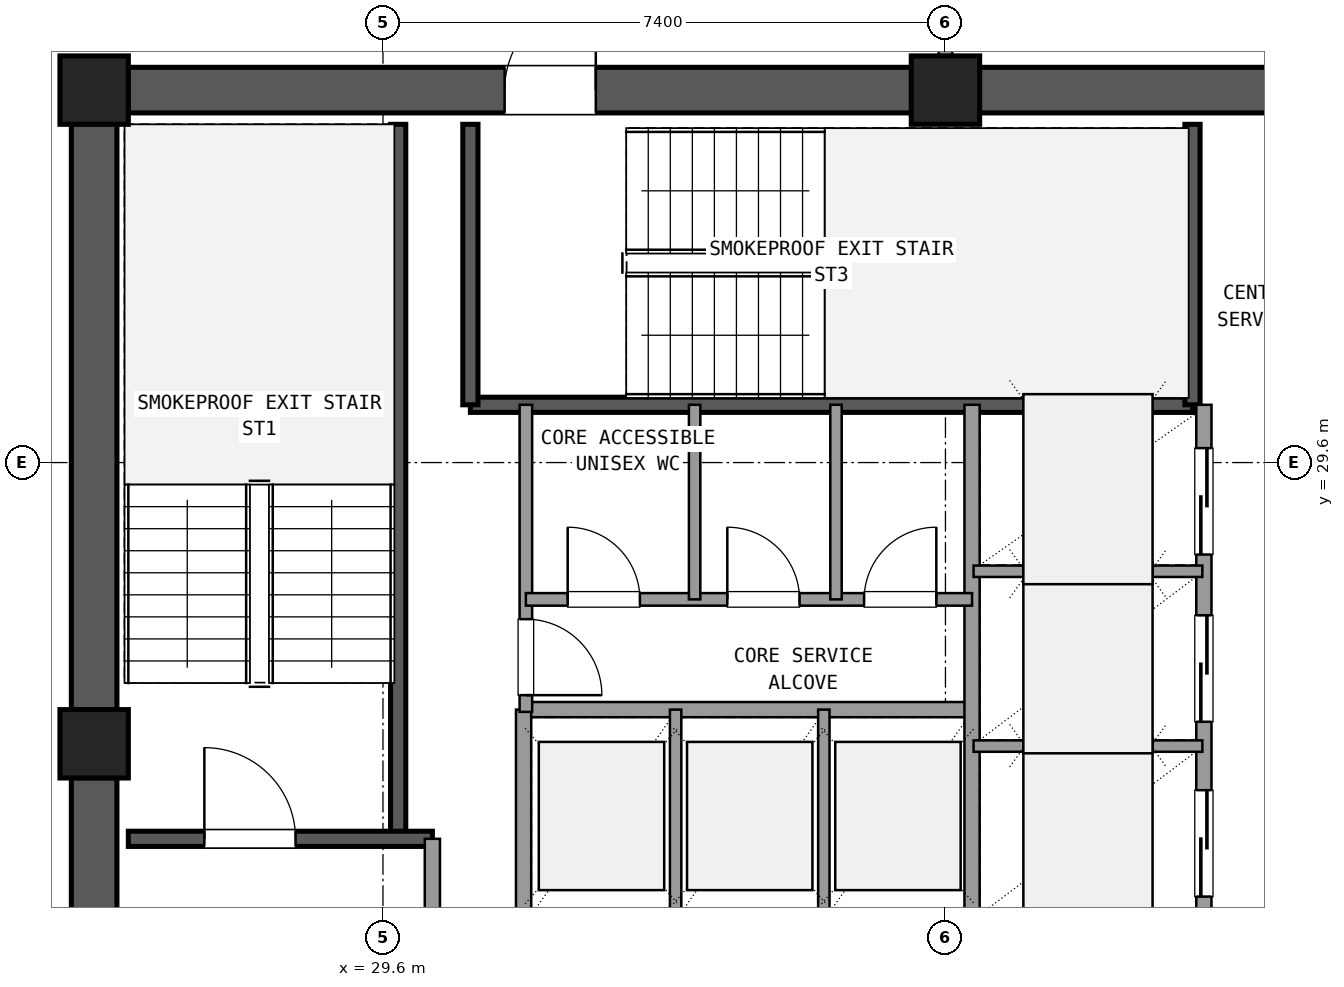
"""IFC4 building model, lengths in metres.
Left out: names, types, materials, properties, quantities, classifications, styles, units other than length and angle.
Written with IfcOpenShell. Run it as: python <this file> out.ifc"""

import sys

from ifc_helpers import new_model, si_unit, direction, frame, frame_2d, origin, origin_2d, place, context, subcontext, project, spatial, rectangle, extrude, element, fill, save


model = new_model("IFC4")
c1 = context("Model", 3, precision=1e-05, world=origin(), true_north=direction((0.0, 1.0)))
c2 = subcontext(c1, "Body", "Model", "MODEL_VIEW")
j1 = project(units=[si_unit("LENGTHUNIT", "METRE"), si_unit("PLANEANGLEUNIT", "RADIAN")], contexts=[c1])
p1 = place(None, origin())
s1 = spatial("IfcSite", under=j1, at=p1, CompositionType="ELEMENT")
p2 = place(p1, origin())
s2 = spatial("IfcBuilding", under=s1, at=p2, CompositionType="ELEMENT")
p3 = place(p2, frame((0.0, 0.0, 253.62)))
s3 = spatial("IfcBuildingStorey", under=s2, at=p3, CompositionType="ELEMENT", Elevation=253.62)
for number, where, z_axis, x_axis in (
    (1, (37.0, 34.5, 0.0), (0.0, 0.0, 1.0), (1.0, 0.0, 0.0)),
    (2, (25.8, 34.5, 0.0), (0.0, 0.0, 1.0), (1.0, 0.0, 0.0)),
    (3, (25.8, 25.9, 0.0), (0.0, 0.0, 1.0), (1.0, 0.0, 0.0)),
):
    element("IfcColumn", number, at=place(p3, frame(where, z_axis=z_axis, x_axis=x_axis)), inside=s3, PredefinedType="COLUMN", context=c2, shape_type="SweptSolid", body=[
        extrude(rectangle(XDim=0.9, YDim=0.9, at=origin_2d()), origin(), (0.0, 0.0, 1.0), 3.6),
    ])
p4 = place(p3, frame((47.755, 34.5, 0.0), z_axis=(0.0, 0.0, 1.0), x_axis=(-1.0, 0.0, 0.0)))
e4 = element("IfcWall", 4, at=p4, inside=s3, PredefinedType="SHEAR", context=c2, shape_type="SweptSolid", body=[
    extrude(rectangle(XDim=10.31, YDim=0.6, at=frame_2d((5.155, 0.0))), origin(), (0.0, 0.0, 1.0), 3.32),
])
p5 = place(p4, frame((4.655, 0.0, 0.0)))
e5 = element("IfcOpeningElement", 5, at=p5, cuts=e4, PredefinedType="OPENING", context=c2, shape_type="SweptSolid", body=[
    extrude(rectangle(XDim=1.6, YDim=2.2, at=frame_2d((0.8, 1.1))), frame((0.0, 0.31, 0.0), z_axis=(0.0, -1.0, 0.0), x_axis=(1.0, 0.0, 0.0)), (0.0, 0.0, 1.0), 0.62),
])
p6 = place(p3, frame((36.555, 34.5, 0.0), z_axis=(0.0, 0.0, 1.0), x_axis=(-1.0, 0.0, 0.0)))
e6 = element("IfcWall", 6, at=p6, inside=s3, PredefinedType="SHEAR", context=c2, shape_type="SweptSolid", body=[
    extrude(rectangle(XDim=10.31, YDim=0.6, at=frame_2d((5.155, 0.0))), origin(), (0.0, 0.0, 1.0), 3.32),
])
p7 = place(p6, frame((4.155, 0.0, 0.0)))
e7 = element("IfcOpeningElement", 7, at=p7, cuts=e6, PredefinedType="OPENING", context=c2, shape_type="SweptSolid", body=[
    extrude(rectangle(XDim=1.2, YDim=2.15, at=frame_2d((0.6, 1.075))), frame((0.0, 0.31, 0.0), z_axis=(0.0, -1.0, 0.0), x_axis=(1.0, 0.0, 0.0)), (0.0, 0.0, 1.0), 0.62),
])
p8 = place(p3, frame((25.8, 34.055, 0.0), z_axis=(0.0, 0.0, 1.0), x_axis=(0.0, -1.0, 0.0)))
e8 = element("IfcWall", 8, at=p8, inside=s3, PredefinedType="SHEAR", context=c2, shape_type="SweptSolid", body=[
    extrude(rectangle(XDim=7.71, YDim=0.6, at=frame_2d((3.855, 0.0))), origin(), (0.0, 0.0, 1.0), 3.32),
])
p9 = place(p3, frame((25.8, 25.455, 0.0), z_axis=(0.0, 0.0, 1.0), x_axis=(0.0, -1.0, 0.0)))
e9 = element("IfcWall", 9, at=p9, inside=s3, PredefinedType="SHEAR", context=c2, shape_type="SweptSolid", body=[
    extrude(rectangle(XDim=7.71, YDim=0.6, at=frame_2d((3.855, 0.0))), origin(), (0.0, 0.0, 1.0), 3.32),
])
p10 = place(p9, frame((2.205, 0.0, 0.0)))
e10 = element("IfcOpeningElement", 10, at=p10, cuts=e9, PredefinedType="OPENING", context=c2, shape_type="SweptSolid", body=[
    extrude(rectangle(XDim=1.2, YDim=2.15, at=frame_2d((0.6, 1.075))), frame((0.0, 0.31, 0.0), z_axis=(0.0, -1.0, 0.0), x_axis=(1.0, 0.0, 0.0)), (0.0, 0.0, 1.0), 0.62),
])
p11 = place(p3, frame((29.8, 24.65, 0.0), z_axis=(0.0, 0.0, 1.0), x_axis=(0.0, 1.0, 0.0)))
e11 = element("IfcWall", 11, at=p11, inside=s3, PredefinedType="SHEAR", context=c2, shape_type="SweptSolid", body=[
    extrude(rectangle(XDim=9.4, YDim=0.2, at=frame_2d((4.7, 0.0))), origin(), (0.0, 0.0, 1.0), 3.32),
])
p12 = place(p3, frame((26.25, 24.65, 0.0), z_axis=(0.0, 0.0, 1.0), x_axis=(1.0, 0.0, 0.0)))
e12 = element("IfcWall", 12, at=p12, inside=s3, PredefinedType="SHEAR", context=c2, shape_type="SweptSolid", body=[
    extrude(rectangle(XDim=4.0, YDim=0.2, at=frame_2d((2.0, 0.0))), origin(), (0.0, 0.0, 1.0), 3.32),
])
p13 = place(p12, frame((1.0, 0.0, 0.0)))
e13 = element("IfcOpeningElement", 13, at=p13, cuts=e12, PredefinedType="OPENING", context=c2, shape_type="SweptSolid", body=[
    extrude(rectangle(XDim=1.2, YDim=2.15, at=frame_2d((0.6, 1.075))), frame((0.0, 0.11, 0.0), z_axis=(0.0, -1.0, 0.0), x_axis=(1.0, 0.0, 0.0)), (0.0, 0.0, 1.0), 0.22),
])
p14 = place(p3, frame((30.75, 30.36, 0.0), z_axis=(0.0, 0.0, 1.0), x_axis=(1.0, 0.0, 0.0)))
e14 = element("IfcWall", 14, at=p14, inside=s3, PredefinedType="SHEAR", context=c2, shape_type="SweptSolid", body=[
    extrude(rectangle(XDim=9.5, YDim=0.2, at=frame_2d((4.75, 0.0))), origin(), (0.0, 0.0, 1.0), 3.32),
])
for number, where, z_axis, x_axis in (
    (15, (30.75, 30.36, 0.0), (0.0, 0.0, 1.0), (0.0, 1.0, 0.0)),
    (16, (40.25, 30.36, 0.0), (0.0, 0.0, 1.0), (0.0, 1.0, 0.0)),
):
    element("IfcWall", number, at=place(p3, frame(where, z_axis=z_axis, x_axis=x_axis)), inside=s3, PredefinedType="SHEAR", context=c2, shape_type="SweptSolid", body=[
        extrude(rectangle(XDim=3.69, YDim=0.2, at=frame_2d((1.845, 0.0))), origin(), (0.0, 0.0, 1.0), 3.32),
    ])
p15 = place(p3, frame((30.25, 17.75, 0.0), z_axis=(0.0, 0.0, 1.0), x_axis=(0.0, 1.0, 0.0)))
e17 = element("IfcWall", 17, at=p15, inside=s3, PredefinedType="SOLIDWALL", context=c2, shape_type="SweptSolid", body=[
    extrude(rectangle(XDim=6.9, YDim=0.2, at=frame_2d((3.45, 0.0))), origin(), (0.0, 0.0, 1.0), 2.61),
])
p16 = place(p15, frame((4.15, 0.0, 0.0)))
e18 = element("IfcOpeningElement", 18, at=p16, cuts=e17, PredefinedType="OPENING", context=c2, shape_type="SweptSolid", body=[
    extrude(rectangle(XDim=1.2, YDim=2.15, at=frame_2d((0.6, 1.075))), frame((0.0, 0.11, 0.0), z_axis=(0.0, -1.0, 0.0), x_axis=(1.0, 0.0, 0.0)), (0.0, 0.0, 1.0), 0.22),
])
p17 = place(p3, frame((31.45, 26.35, 0.0), z_axis=(0.0, 0.0, 1.0), x_axis=(1.0, 0.0, 0.0)))
e19 = element("IfcWall", 19, at=p17, inside=s3, PredefinedType="SOLIDWALL", context=c2, shape_type="SweptSolid", body=[
    extrude(rectangle(XDim=5.9, YDim=0.2, at=frame_2d((2.95, 0.0))), origin(), (0.0, 0.0, 1.0), 2.61),
])
p18 = place(p3, frame((31.45, 23.54, 0.0), z_axis=(0.0, 0.0, 1.0), x_axis=(0.0, 1.0, 0.0)))
e20 = element("IfcWall", 20, at=p18, inside=s3, PredefinedType="SOLIDWALL", context=c2, shape_type="SweptSolid", body=[
    extrude(rectangle(XDim=2.81, YDim=0.2, at=frame_2d((1.405, 0.0))), origin(), (0.0, 0.0, 1.0), 2.61),
])
for number, where, z_axis, x_axis in (
    (21, (33.45, 23.54, 0.0), (0.0, 0.0, 1.0), (0.0, 1.0, 0.0)),
    (22, (35.4, 23.54, 0.0), (0.0, 0.0, 1.0), (0.0, 1.0, 0.0)),
):
    element("IfcWall", number, at=place(p3, frame(where, z_axis=z_axis, x_axis=x_axis)), inside=s3, PredefinedType="PARTITIONING", context=c2, shape_type="SweptSolid", body=[
        extrude(rectangle(XDim=2.81, YDim=0.15, at=frame_2d((1.405, 0.0))), origin(), (0.0, 0.0, 1.0), 2.61),
    ])
p19 = place(p3, frame((37.35, 23.54, 0.0), z_axis=(0.0, 0.0, 1.0), x_axis=(0.0, 1.0, 0.0)))
e23 = element("IfcWall", 23, at=p19, inside=s3, PredefinedType="SOLIDWALL", context=c2, shape_type="SweptSolid", body=[
    extrude(rectangle(XDim=6.82, YDim=0.2, at=frame_2d((3.41, 0.0))), origin(), (0.0, 0.0, 1.0), 2.61),
])
p20 = place(p3, frame((40.4, 23.54, 0.0), z_axis=(0.0, 0.0, 1.0), x_axis=(0.0, 1.0, 0.0)))
e24 = element("IfcWall", 24, at=p20, inside=s3, PredefinedType="SOLIDWALL", context=c2, shape_type="SweptSolid", body=[
    extrude(rectangle(XDim=6.82, YDim=0.2, at=frame_2d((3.41, 0.0))), origin(), (0.0, 0.0, 1.0), 2.61),
])
p21 = place(p20, frame((0.35, 0.0, 0.0)))
e25 = element("IfcOpeningElement", 25, at=p21, cuts=e24, PredefinedType="OPENING", context=c2, shape_type="SweptSolid", body=[
    extrude(rectangle(XDim=1.4, YDim=2.2, at=frame_2d((0.7, 1.1))), frame((0.0, 0.11, 0.0), z_axis=(0.0, -1.0, 0.0), x_axis=(1.0, 0.0, 0.0)), (0.0, 0.0, 1.0), 0.22),
])
p22 = place(p20, frame((2.65, 0.0, 0.0)))
e26 = element("IfcOpeningElement", 26, at=p22, cuts=e24, PredefinedType="OPENING", context=c2, shape_type="SweptSolid", body=[
    extrude(rectangle(XDim=1.4, YDim=2.2, at=frame_2d((0.7, 1.1))), frame((0.0, 0.11, 0.0), z_axis=(0.0, -1.0, 0.0), x_axis=(1.0, 0.0, 0.0)), (0.0, 0.0, 1.0), 0.22),
])
p23 = place(p20, frame((4.85, 0.0, 0.0)))
e27 = element("IfcOpeningElement", 27, at=p23, cuts=e24, PredefinedType="OPENING", context=c2, shape_type="SweptSolid", body=[
    extrude(rectangle(XDim=1.4, YDim=2.2, at=frame_2d((0.7, 1.1))), frame((0.0, 0.11, 0.0), z_axis=(0.0, -1.0, 0.0), x_axis=(1.0, 0.0, 0.0)), (0.0, 0.0, 1.0), 0.22),
])
for number, where, z_axis, x_axis in (
    (28, (37.37, 25.87, 0.0), (0.0, 0.0, 1.0), (1.0, 0.0, 0.0)),
    (29, (37.37, 28.17, 0.0), (0.0, 0.0, 1.0), (1.0, 0.0, 0.0)),
):
    element("IfcWall", number, at=place(p3, frame(where, z_axis=z_axis, x_axis=x_axis)), inside=s3, PredefinedType="PARTITIONING", context=c2, shape_type="SweptSolid", body=[
        extrude(rectangle(XDim=3.01, YDim=0.15, at=frame_2d((1.505, 0.0))), origin(), (0.0, 0.0, 1.0), 2.61),
    ])
p24 = place(p3, frame((31.48, 26.32, 0.0), z_axis=(0.0, 0.0, 1.0), x_axis=(0.0, 1.0, 0.0)))
e30 = element("IfcWall", 30, at=p24, inside=s3, PredefinedType="PLUMBINGWALL", context=c2, shape_type="SweptSolid", body=[
    extrude(rectangle(XDim=4.04, YDim=0.165, at=frame_2d((2.02, 0.0))), origin(), (0.0, 0.0, 1.0), 2.61),
])
p25 = place(p24, frame((0.22, 0.0, 0.0)))
e31 = element("IfcOpeningElement", 31, at=p25, cuts=e30, PredefinedType="OPENING", context=c2, shape_type="SweptSolid", body=[
    extrude(rectangle(XDim=1.0, YDim=2.15, at=frame_2d((0.5, 1.075))), frame((0.0, 0.093, 0.0), z_axis=(0.0, -1.0, 0.0), x_axis=(1.0, 0.0, 0.0)), (0.0, 0.0, 1.0), 0.185),
])
p26 = place(p3, frame((31.48, 27.8, 0.0), z_axis=(0.0, 0.0, 1.0), x_axis=(1.0, 0.0, 0.0)))
e32 = element("IfcWall", 32, at=p26, inside=s3, PredefinedType="PLUMBINGWALL", context=c2, shape_type="SweptSolid", body=[
    extrude(rectangle(XDim=5.87, YDim=0.165, at=frame_2d((2.935, 0.0))), origin(), (0.0, 0.0, 1.0), 2.61),
])
p27 = place(p26, frame((0.55, 0.0, 0.0)))
e33 = element("IfcOpeningElement", 33, at=p27, cuts=e32, PredefinedType="OPENING", context=c2, shape_type="SweptSolid", body=[
    extrude(rectangle(XDim=0.95, YDim=2.1, at=frame_2d((0.475, 1.05))), frame((0.0, 0.093, 0.0), z_axis=(0.0, -1.0, 0.0), x_axis=(1.0, 0.0, 0.0)), (0.0, 0.0, 1.0), 0.185),
])
p28 = place(p26, frame((2.65, 0.0, 0.0)))
e34 = element("IfcOpeningElement", 34, at=p28, cuts=e32, PredefinedType="OPENING", context=c2, shape_type="SweptSolid", body=[
    extrude(rectangle(XDim=0.95, YDim=2.1, at=frame_2d((0.475, 1.05))), frame((0.0, 0.093, 0.0), z_axis=(0.0, -1.0, 0.0), x_axis=(1.0, 0.0, 0.0)), (0.0, 0.0, 1.0), 0.185),
])
p29 = place(p26, frame((4.45, 0.0, 0.0)))
e35 = element("IfcOpeningElement", 35, at=p29, cuts=e32, PredefinedType="OPENING", context=c2, shape_type="SweptSolid", body=[
    extrude(rectangle(XDim=0.95, YDim=2.1, at=frame_2d((0.475, 1.05))), frame((0.0, 0.093, 0.0), z_axis=(0.0, -1.0, 0.0), x_axis=(1.0, 0.0, 0.0)), (0.0, 0.0, 1.0), 0.185),
])
for number, where, z_axis, x_axis in (
    (36, (33.7, 27.8, 0.0), (0.0, 0.0, 1.0), (0.0, 1.0, 0.0)),
    (37, (35.56, 27.8, 0.0), (0.0, 0.0, 1.0), (0.0, 1.0, 0.0)),
):
    element("IfcWall", number, at=place(p3, frame(where, z_axis=z_axis, x_axis=x_axis)), inside=s3, PredefinedType="PARTITIONING", context=c2, shape_type="SweptSolid", body=[
        extrude(rectangle(XDim=2.56, YDim=0.15, at=frame_2d((1.28, 0.0))), origin(), (0.0, 0.0, 1.0), 2.61),
    ])
p30 = place(p3, frame((37.0, 34.95, 0.0), z_axis=(0.0, 0.0, 1.0), x_axis=(0.0, 1.0, 0.0)))
e38 = element("IfcWall", 38, at=p30, inside=s3, PredefinedType="PARTITIONING", context=c2, shape_type="SweptSolid", body=[
    extrude(rectangle(XDim=2.7, YDim=0.18, at=frame_2d((1.35, 0.0))), origin(), (0.0, 0.0, 1.0), 2.61),
])
p31 = place(p30, frame((0.35, 0.0, 0.0)))
e39 = element("IfcOpeningElement", 39, at=p31, cuts=e38, PredefinedType="OPENING", context=c2, shape_type="SweptSolid", body=[
    extrude(rectangle(XDim=2.0, YDim=2.2, at=frame_2d((1.0, 1.1))), frame((0.0, 0.1, 0.0), z_axis=(0.0, -1.0, 0.0), x_axis=(1.0, 0.0, 0.0)), (0.0, 0.0, 1.0), 0.2),
])
p32 = place(p13, origin())
e40 = element("IfcDoor", 40, at=p32, inside=s3, OperationType="SINGLE_SWING_LEFT", PredefinedType="DOOR", context=c2, shape_type="SweptSolid", body=[
    extrude(rectangle(XDim=1.2, YDim=2.15, at=frame_2d((0.6, 1.075))), frame((0.0, 0.025, 0.0), z_axis=(0.0, -1.0, 0.0), x_axis=(1.0, 0.0, 0.0)), (0.0, 0.0, 1.0), 0.05),
])
fill(e13, e40)
p33 = place(p7, frame((1.2, 0.0, 0.0), z_axis=(0.0, 0.0, 1.0), x_axis=(-1.0, 0.0, 0.0)))
e41 = element("IfcDoor", 41, at=p33, inside=s3, OperationType="SINGLE_SWING_LEFT", PredefinedType="DOOR", context=c2, shape_type="SweptSolid", body=[
    extrude(rectangle(XDim=1.2, YDim=2.15, at=frame_2d((0.6, 1.075))), frame((0.0, 0.025, 0.0), z_axis=(0.0, -1.0, 0.0), x_axis=(1.0, 0.0, 0.0)), (0.0, 0.0, 1.0), 0.05),
])
fill(e7, e41)
p34 = place(p21, origin())
e42 = element("IfcDoor", 42, at=p34, inside=s3, OperationType="SLIDING_TO_LEFT", PredefinedType="DOOR", context=c2, shape_type="SweptSolid", body=[
    extrude(rectangle(XDim=1.4, YDim=2.2, at=frame_2d((0.7, 1.1))), frame((0.0, 0.025, 0.0), z_axis=(0.0, -1.0, 0.0), x_axis=(1.0, 0.0, 0.0)), (0.0, 0.0, 1.0), 0.05),
])
fill(e25, e42)
p35 = place(p22, origin())
e43 = element("IfcDoor", 43, at=p35, inside=s3, OperationType="SLIDING_TO_LEFT", PredefinedType="DOOR", context=c2, shape_type="SweptSolid", body=[
    extrude(rectangle(XDim=1.4, YDim=2.2, at=frame_2d((0.7, 1.1))), frame((0.0, 0.025, 0.0), z_axis=(0.0, -1.0, 0.0), x_axis=(1.0, 0.0, 0.0)), (0.0, 0.0, 1.0), 0.05),
])
fill(e26, e43)
p36 = place(p23, origin())
e44 = element("IfcDoor", 44, at=p36, inside=s3, OperationType="SLIDING_TO_RIGHT", PredefinedType="DOOR", context=c2, shape_type="SweptSolid", body=[
    extrude(rectangle(XDim=1.4, YDim=2.2, at=frame_2d((0.7, 1.1))), frame((0.0, 0.025, 0.0), z_axis=(0.0, -1.0, 0.0), x_axis=(1.0, 0.0, 0.0)), (0.0, 0.0, 1.0), 0.05),
])
fill(e27, e44)
p37 = place(p25, frame((1.0, 0.0, 0.0), z_axis=(0.0, 0.0, 1.0), x_axis=(-1.0, 0.0, 0.0)))
e45 = element("IfcDoor", 45, at=p37, inside=s3, OperationType="SINGLE_SWING_LEFT", PredefinedType="DOOR", context=c2, shape_type="SweptSolid", body=[
    extrude(rectangle(XDim=1.0, YDim=2.15, at=frame_2d((0.5, 1.075))), frame((0.0, 0.025, 0.0), z_axis=(0.0, -1.0, 0.0), x_axis=(1.0, 0.0, 0.0)), (0.0, 0.0, 1.0), 0.05),
])
fill(e31, e45)
p38 = place(p27, origin())
e46 = element("IfcDoor", 46, at=p38, inside=s3, OperationType="SINGLE_SWING_LEFT", PredefinedType="DOOR", context=c2, shape_type="SweptSolid", body=[
    extrude(rectangle(XDim=0.95, YDim=2.1, at=frame_2d((0.475, 1.05))), frame((0.0, 0.025, 0.0), z_axis=(0.0, -1.0, 0.0), x_axis=(1.0, 0.0, 0.0)), (0.0, 0.0, 1.0), 0.05),
])
fill(e33, e46)
p39 = place(p28, origin())
e47 = element("IfcDoor", 47, at=p39, inside=s3, OperationType="SINGLE_SWING_LEFT", PredefinedType="DOOR", context=c2, shape_type="SweptSolid", body=[
    extrude(rectangle(XDim=0.95, YDim=2.1, at=frame_2d((0.475, 1.05))), frame((0.0, 0.025, 0.0), z_axis=(0.0, -1.0, 0.0), x_axis=(1.0, 0.0, 0.0)), (0.0, 0.0, 1.0), 0.05),
])
fill(e34, e47)
p40 = place(p29, origin())
e48 = element("IfcDoor", 48, at=p40, inside=s3, OperationType="SINGLE_SWING_RIGHT", PredefinedType="DOOR", context=c2, shape_type="SweptSolid", body=[
    extrude(rectangle(XDim=0.95, YDim=2.1, at=frame_2d((0.475, 1.05))), frame((0.0, 0.025, 0.0), z_axis=(0.0, -1.0, 0.0), x_axis=(1.0, 0.0, 0.0)), (0.0, 0.0, 1.0), 0.05),
])
fill(e35, e48)
save(model, sys.argv[1])
